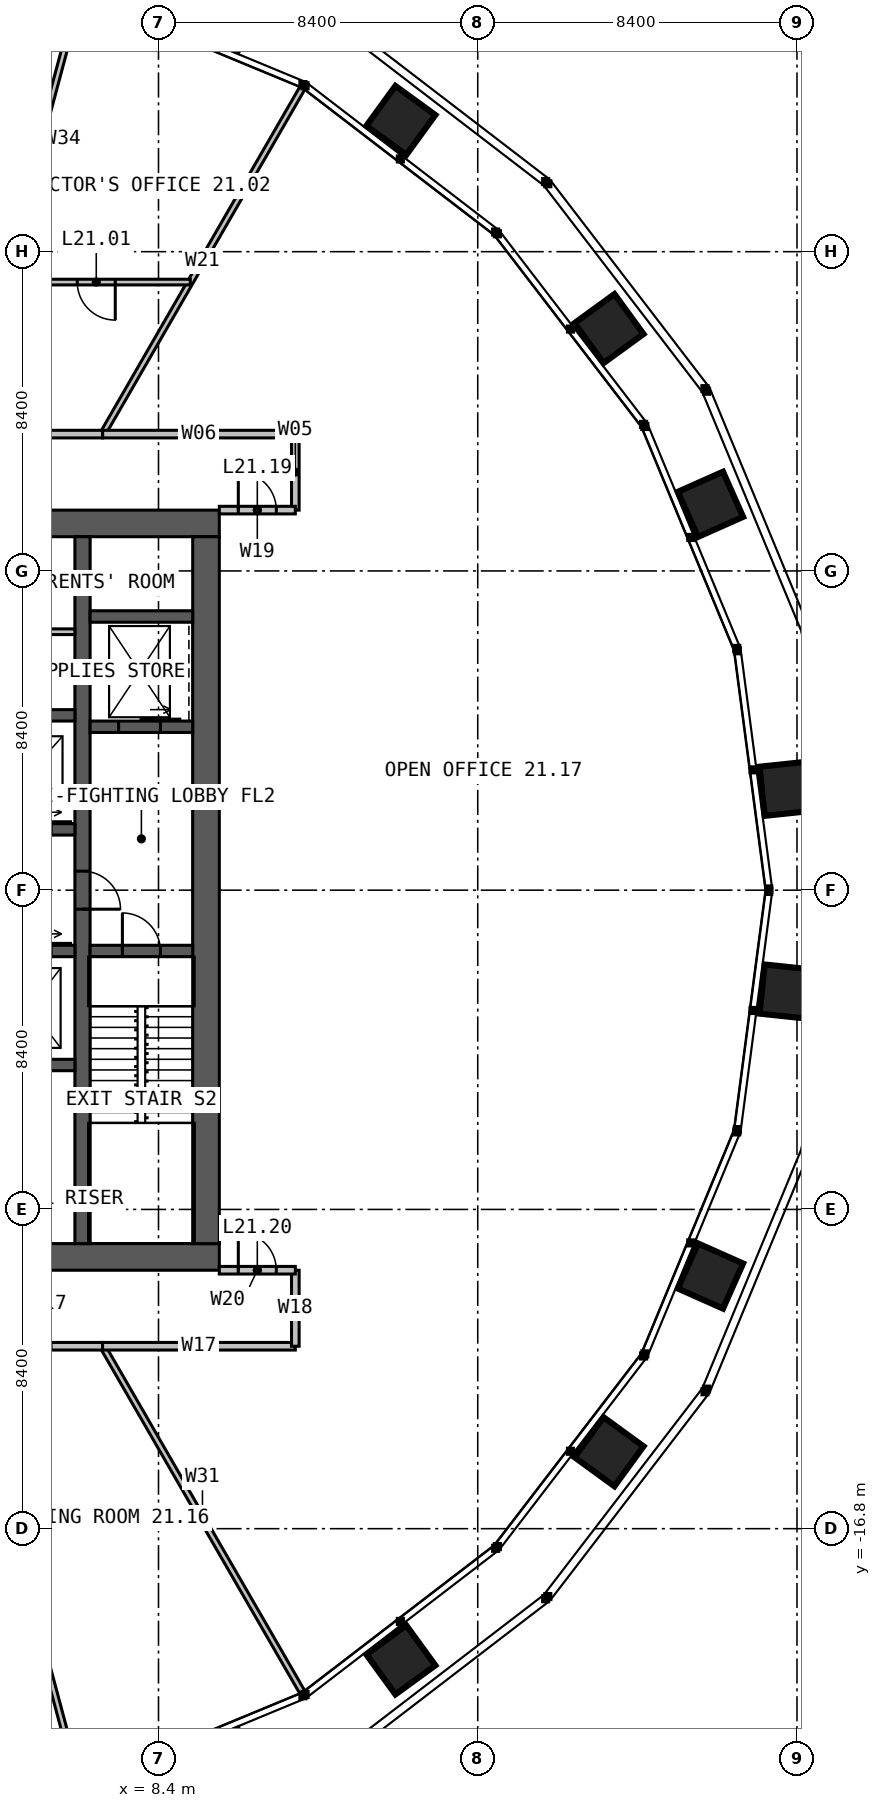
"""IFC4 building model, lengths in metres.
Left out: names, types, materials, properties, quantities, classifications, styles, units other than length and angle.
Written with IfcOpenShell. Run it as: python <this file> out.ifc"""

import sys

from ifc_helpers import new_model, si_unit, direction, frame, frame_2d, origin, place, context, subcontext, project, spatial, rectangle, extrude, element, fill, save


model = new_model("IFC4")
c1 = context("Model", 3, precision=1e-05, world=origin(), true_north=direction((0.0, 1.0)))
c2 = subcontext(c1, "Body", "Model", "MODEL_VIEW")
j1 = project(units=[si_unit("LENGTHUNIT", "METRE"), si_unit("PLANEANGLEUNIT", "RADIAN")], contexts=[c1])
p1 = place(None, origin())
s1 = spatial("IfcSite", under=j1, at=p1, CompositionType="ELEMENT")
p2 = place(p1, origin())
s2 = spatial("IfcBuilding", under=s1, at=p2, CompositionType="ELEMENT")
p3 = place(p2, frame((0.0, 0.0, 90.0)))
s3 = spatial("IfcBuildingStorey", under=s2, at=p3, CompositionType="ELEMENT", Elevation=90.0)
p4 = place(p3, frame((-10.0, 9.65, 0.0), z_axis=(0.0, 0.0, 1.0), x_axis=(1.0, 0.0, 0.0)))
e1 = element("IfcWall", 1, at=p4, inside=s3, PredefinedType="SOLIDWALL", context=c2, shape_type="SweptSolid", body=[
    extrude(rectangle(XDim=20.0, YDim=0.7, at=frame_2d((10.0, 0.0))), origin(), (0.0, 0.0, 1.0), 4.0),
])
p5 = place(p4, frame((9.4, 0.0, 0.0)))
e2 = element("IfcOpeningElement", 2, at=p5, cuts=e1, PredefinedType="OPENING", context=c2, shape_type="SweptSolid", body=[
    extrude(rectangle(XDim=1.2, YDim=2.2, at=frame_2d((0.6, 1.1))), frame((0.0, 0.36, 0.0), z_axis=(0.0, -1.0, 0.0), x_axis=(1.0, 0.0, 0.0)), (0.0, 0.0, 1.0), 0.72),
])
p6 = place(p3, frame((10.0, -9.65, 0.0), z_axis=(0.0, 0.0, 1.0), x_axis=(-1.0, 0.0, 0.0)))
e3 = element("IfcWall", 3, at=p6, inside=s3, PredefinedType="SOLIDWALL", context=c2, shape_type="SweptSolid", body=[
    extrude(rectangle(XDim=20.0, YDim=0.7, at=frame_2d((10.0, 0.0))), origin(), (0.0, 0.0, 1.0), 4.0),
])
p7 = place(p6, frame((6.875, 0.0, 0.0)))
e4 = element("IfcOpeningElement", 4, at=p7, cuts=e3, PredefinedType="OPENING", context=c2, shape_type="SweptSolid", body=[
    extrude(rectangle(XDim=1.2, YDim=2.2, at=frame_2d((0.6, 1.1))), frame((0.0, 0.36, 0.0), z_axis=(0.0, -1.0, 0.0), x_axis=(1.0, 0.0, 0.0)), (0.0, 0.0, 1.0), 0.72),
])
p8 = place(p3, frame((9.65, -9.3, 0.0), z_axis=(0.0, 0.0, 1.0), x_axis=(0.0, 1.0, 0.0)))
e5 = element("IfcWall", 5, at=p8, inside=s3, PredefinedType="SOLIDWALL", context=c2, shape_type="SweptSolid", body=[
    extrude(rectangle(XDim=18.6, YDim=0.7, at=frame_2d((9.3, 0.0))), origin(), (0.0, 0.0, 1.0), 4.0),
])
p9 = place(p3, frame((6.4, 9.3, 0.0), z_axis=(0.0, 0.0, 1.0), x_axis=(0.0, -1.0, 0.0)))
e6 = element("IfcWall", 6, at=p9, inside=s3, PredefinedType="SOLIDWALL", context=c2, shape_type="SweptSolid", body=[
    extrude(rectangle(XDim=18.6, YDim=0.4, at=frame_2d((9.3, 0.0))), origin(), (0.0, 0.0, 1.0), 4.0),
])
p10 = place(p9, frame((8.8, 0.0, 0.0)))
e7 = element("IfcOpeningElement", 7, at=p10, cuts=e6, PredefinedType="OPENING", context=c2, shape_type="SweptSolid", body=[
    extrude(rectangle(XDim=1.0, YDim=2.2, at=frame_2d((0.5, 1.1))), frame((0.0, 0.21, 0.0), z_axis=(0.0, -1.0, 0.0), x_axis=(1.0, 0.0, 0.0)), (0.0, 0.0, 1.0), 0.42),
])
p11 = place(p3, frame((1.35, 1.6, 0.0), z_axis=(0.0, 0.0, 1.0), x_axis=(1.0, 0.0, 0.0)))
e8 = element("IfcWall", 8, at=p11, inside=s3, PredefinedType="SOLIDWALL", context=c2, shape_type="SweptSolid", body=[
    extrude(rectangle(XDim=4.85, YDim=0.3, at=frame_2d((2.425, 0.0))), origin(), (0.0, 0.0, 1.0), 4.0),
])
p12 = place(p11, frame((0.6, 0.0, 0.0)))
e9 = element("IfcOpeningElement", 9, at=p12, cuts=e8, PredefinedType="OPENING", context=c2, shape_type="SweptSolid", body=[
    extrude(rectangle(XDim=1.1, YDim=2.2, at=frame_2d((0.55, 1.1))), frame((0.0, 0.16, 0.0), z_axis=(0.0, -1.0, 0.0), x_axis=(1.0, 0.0, 0.0)), (0.0, 0.0, 1.0), 0.32),
])
p13 = place(p11, frame((3.125, 0.0, 0.0)))
e10 = element("IfcOpeningElement", 10, at=p13, cuts=e8, PredefinedType="OPENING", context=c2, shape_type="SweptSolid", body=[
    extrude(rectangle(XDim=1.1, YDim=2.2, at=frame_2d((0.55, 1.1))), frame((0.0, 0.16, 0.0), z_axis=(0.0, -1.0, 0.0), x_axis=(1.0, 0.0, 0.0)), (0.0, 0.0, 1.0), 0.32),
])
p14 = place(p3, frame((1.35, 4.6, 0.0), z_axis=(0.0, 0.0, 1.0), x_axis=(1.0, 0.0, 0.0)))
e11 = element("IfcWall", 11, at=p14, inside=s3, PredefinedType="SOLIDWALL", context=c2, shape_type="SweptSolid", body=[
    extrude(rectangle(XDim=4.85, YDim=0.3, at=frame_2d((2.425, 0.0))), origin(), (0.0, 0.0, 1.0), 4.0),
])
p15 = place(p3, frame((3.85, -1.6, 0.0), z_axis=(0.0, 0.0, 1.0), x_axis=(1.0, 0.0, 0.0)))
e12 = element("IfcWall", 12, at=p15, inside=s3, PredefinedType="SOLIDWALL", context=c2, shape_type="SweptSolid", body=[
    extrude(rectangle(XDim=2.35, YDim=0.3, at=frame_2d((1.175, 0.0))), origin(), (0.0, 0.0, 1.0), 4.0),
])
p16 = place(p15, frame((0.625, 0.0, 0.0)))
e13 = element("IfcOpeningElement", 13, at=p16, cuts=e12, PredefinedType="OPENING", context=c2, shape_type="SweptSolid", body=[
    extrude(rectangle(XDim=1.1, YDim=2.2, at=frame_2d((0.55, 1.1))), frame((0.0, 0.16, 0.0), z_axis=(0.0, -1.0, 0.0), x_axis=(1.0, 0.0, 0.0)), (0.0, 0.0, 1.0), 0.32),
])
p17 = place(p3, frame((3.85, -4.6, 0.0), z_axis=(0.0, 0.0, 1.0), x_axis=(1.0, 0.0, 0.0)))
e14 = element("IfcWall", 14, at=p17, inside=s3, PredefinedType="SOLIDWALL", context=c2, shape_type="SweptSolid", body=[
    extrude(rectangle(XDim=2.35, YDim=0.3, at=frame_2d((1.175, 0.0))), origin(), (0.0, 0.0, 1.0), 4.0),
])
p18 = place(p3, frame((6.6, -1.6, 0.0), z_axis=(0.0, 0.0, 1.0), x_axis=(1.0, 0.0, 0.0)))
e15 = element("IfcWall", 15, at=p18, inside=s3, PredefinedType="SOLIDWALL", context=c2, shape_type="SweptSolid", body=[
    extrude(rectangle(XDim=2.7, YDim=0.3, at=frame_2d((1.35, 0.0))), origin(), (0.0, 0.0, 1.0), 4.0),
])
p19 = place(p18, frame((0.85, 0.0, 0.0)))
e16 = element("IfcOpeningElement", 16, at=p19, cuts=e15, PredefinedType="OPENING", context=c2, shape_type="SweptSolid", body=[
    extrude(rectangle(XDim=1.0, YDim=2.2, at=frame_2d((0.5, 1.1))), frame((0.0, 0.16, 0.0), z_axis=(0.0, -1.0, 0.0), x_axis=(1.0, 0.0, 0.0)), (0.0, 0.0, 1.0), 0.32),
])
p20 = place(p3, frame((6.6, 4.3, 0.0), z_axis=(0.0, 0.0, 1.0), x_axis=(1.0, 0.0, 0.0)))
e17 = element("IfcWall", 17, at=p20, inside=s3, PredefinedType="SOLIDWALL", context=c2, shape_type="SweptSolid", body=[
    extrude(rectangle(XDim=2.7, YDim=0.3, at=frame_2d((1.35, 0.0))), origin(), (0.0, 0.0, 1.0), 4.0),
])
p21 = place(p20, frame((0.75, 0.0, 0.0)))
e18 = element("IfcOpeningElement", 18, at=p21, cuts=e17, PredefinedType="OPENING", context=c2, shape_type="SweptSolid", body=[
    extrude(rectangle(XDim=1.1, YDim=2.2, at=frame_2d((0.55, 1.1))), frame((0.0, 0.16, 0.0), z_axis=(0.0, -1.0, 0.0), x_axis=(1.0, 0.0, 0.0)), (0.0, 0.0, 1.0), 0.32),
])
p22 = place(p3, frame((6.6, 7.2, 0.0), z_axis=(0.0, 0.0, 1.0), x_axis=(1.0, 0.0, 0.0)))
e19 = element("IfcWall", 19, at=p22, inside=s3, PredefinedType="SOLIDWALL", context=c2, shape_type="SweptSolid", body=[
    extrude(rectangle(XDim=2.7, YDim=0.3, at=frame_2d((1.35, 0.0))), origin(), (0.0, 0.0, 1.0), 4.0),
])
p23 = place(p3, frame((1.35, 6.8, 0.0), z_axis=(0.0, 0.0, 1.0), x_axis=(1.0, 0.0, 0.0)))
e20 = element("IfcWall", 20, at=p23, inside=s3, PredefinedType="PARTITIONING", context=c2, shape_type="SweptSolid", body=[
    extrude(rectangle(XDim=4.85, YDim=0.15, at=frame_2d((2.425, 0.0))), origin(), (0.0, 0.0, 1.0), 3.75),
])
p24 = place(p23, frame((3.15, 0.0, 0.0)))
e21 = element("IfcOpeningElement", 21, at=p24, cuts=e20, PredefinedType="OPENING", context=c2, shape_type="SweptSolid", body=[
    extrude(rectangle(XDim=0.9, YDim=2.2, at=frame_2d((0.45, 1.1))), frame((0.0, 0.085, 0.0), z_axis=(0.0, -1.0, 0.0), x_axis=(1.0, 0.0, 0.0)), (0.0, 0.0, 1.0), 0.17),
])
p25 = place(p3, frame((6.928, 12.0, 0.0), z_axis=(0.0, 0.0, 1.0), x_axis=(0.499995153367, 0.866028201971, 0.0)))
e22 = element("IfcWall", 22, at=p25, inside=s3, PredefinedType="PARTITIONING", context=c2, shape_type="SweptSolid", body=[
    extrude(rectangle(XDim=10.514, YDim=0.15, at=frame_2d((5.257, 0.0))), origin(), (0.0, 0.0, 1.0), 2.89),
])
p26 = place(p3, frame((3.215, -12.0, 0.0), z_axis=(0.0, 0.0, 1.0), x_axis=(0.258816099716, -0.965926615498, 0.0)))
e23 = element("IfcWall", 23, at=p26, inside=s3, PredefinedType="PARTITIONING", context=c2, shape_type="SweptSolid", body=[
    extrude(rectangle(XDim=11.947, YDim=0.15, at=frame_2d((5.973, 0.0))), origin(), (0.0, 0.0, 1.0), 2.89),
])
p27 = place(p3, frame((6.928, -12.0, 0.0), z_axis=(0.0, 0.0, 1.0), x_axis=(0.499995153367, -0.866028201971, 0.0)))
e24 = element("IfcWall", 24, at=p27, inside=s3, PredefinedType="PARTITIONING", context=c2, shape_type="SweptSolid", body=[
    extrude(rectangle(XDim=10.514, YDim=0.15, at=frame_2d((5.257, 0.0))), origin(), (0.0, 0.0, 1.0), 2.89),
])
p28 = place(p3, frame((12.0, 10.0, 0.0), z_axis=(0.0, 0.0, 1.0), x_axis=(0.0, 1.0, 0.0)))
e25 = element("IfcWall", 25, at=p28, inside=s3, PredefinedType="PARTITIONING", context=c2, shape_type="SweptSolid", body=[
    extrude(rectangle(XDim=2.0, YDim=0.2, at=frame_2d((1.0, 0.0))), origin(), (0.0, 0.0, 1.0), 3.8),
])
p29 = place(p3, frame((12.0, 12.0, 0.0), z_axis=(0.0, 0.0, 1.0), x_axis=(-1.0, 0.0, 0.0)))
e26 = element("IfcWall", 26, at=p29, inside=s3, PredefinedType="PARTITIONING", context=c2, shape_type="SweptSolid", body=[
    extrude(rectangle(XDim=5.072, YDim=0.2, at=frame_2d((2.536, 0.0))), origin(), (0.0, 0.0, 1.0), 3.8),
])
p30 = place(p3, frame((9.238, 16.0, 0.0), z_axis=(0.0, 0.0, 1.0), x_axis=(-1.0, 0.0, 0.0)))
e27 = element("IfcWall", 27, at=p30, inside=s3, PredefinedType="PARTITIONING", context=c2, shape_type="SweptSolid", body=[
    extrude(rectangle(XDim=13.525, YDim=0.15, at=frame_2d((6.762, 0.0))), origin(), (0.0, 0.0, 1.0), 2.89),
])
p31 = place(p30, frame((1.975, 0.0, 0.0)))
e28 = element("IfcOpeningElement", 28, at=p31, cuts=e27, PredefinedType="OPENING", context=c2, shape_type="SweptSolid", body=[
    extrude(rectangle(XDim=1.0, YDim=2.2, at=frame_2d((0.5, 1.1))), frame((0.0, 0.085, 0.0), z_axis=(0.0, -1.0, 0.0), x_axis=(1.0, 0.0, 0.0)), (0.0, 0.0, 1.0), 0.17),
])
p32 = place(p30, frame((7.647, 0.0, 0.0)))
e29 = element("IfcOpeningElement", 29, at=p32, cuts=e27, PredefinedType="OPENING", context=c2, shape_type="SweptSolid", body=[
    extrude(rectangle(XDim=1.0, YDim=2.2, at=frame_2d((0.5, 1.1))), frame((0.0, 0.085, 0.0), z_axis=(0.0, -1.0, 0.0), x_axis=(1.0, 0.0, 0.0)), (0.0, 0.0, 1.0), 0.17),
])
p33 = place(p30, frame((11.934, 0.0, 0.0)))
e30 = element("IfcOpeningElement", 30, at=p33, cuts=e27, PredefinedType="OPENING", context=c2, shape_type="SweptSolid", body=[
    extrude(rectangle(XDim=1.0, YDim=2.2, at=frame_2d((0.5, 1.1))), frame((0.0, 0.085, 0.0), z_axis=(0.0, -1.0, 0.0), x_axis=(1.0, 0.0, 0.0)), (0.0, 0.0, 1.0), 0.17),
])
p34 = place(p3, frame((4.287, 16.0, 0.0), z_axis=(0.0, 0.0, 1.0), x_axis=(0.258816859097, 0.965926412025, 0.0)))
e31 = element("IfcWall", 31, at=p34, inside=s3, PredefinedType="PARTITIONING", context=c2, shape_type="SweptSolid", body=[
    extrude(rectangle(XDim=7.806, YDim=0.15, at=frame_2d((3.903, 0.0))), origin(), (0.0, 0.0, 1.0), 2.89),
])
p35 = place(p3, frame((6.928, 12.0, 0.0), z_axis=(0.0, 0.0, 1.0), x_axis=(-1.0, 0.0, 0.0)))
e32 = element("IfcWall", 32, at=p35, inside=s3, PredefinedType="PARTITIONING", context=c2, shape_type="SweptSolid", body=[
    extrude(rectangle(XDim=10.144, YDim=0.2, at=frame_2d((5.072, 0.0))), origin(), (0.0, 0.0, 1.0), 3.8),
])
p36 = place(p35, frame((4.172, 0.0, 0.0)))
e33 = element("IfcOpeningElement", 33, at=p36, cuts=e32, PredefinedType="OPENING", context=c2, shape_type="SweptSolid", body=[
    extrude(rectangle(XDim=1.8, YDim=2.2, at=frame_2d((0.9, 1.1))), frame((0.0, 0.11, 0.0), z_axis=(0.0, -1.0, 0.0), x_axis=(1.0, 0.0, 0.0)), (0.0, 0.0, 1.0), 0.22),
])
p37 = place(p3, frame((3.215, -12.0, 0.0), z_axis=(0.0, 0.0, 1.0), x_axis=(1.0, 0.0, 0.0)))
e34 = element("IfcWall", 34, at=p37, inside=s3, PredefinedType="PARTITIONING", context=c2, shape_type="SweptSolid", body=[
    extrude(rectangle(XDim=3.713, YDim=0.2, at=frame_2d((1.856, 0.0))), origin(), (0.0, 0.0, 1.0), 3.8),
])
p38 = place(p37, frame((1.356, 0.0, 0.0)))
e35 = element("IfcOpeningElement", 35, at=p38, cuts=e34, PredefinedType="OPENING", context=c2, shape_type="SweptSolid", body=[
    extrude(rectangle(XDim=1.0, YDim=2.2, at=frame_2d((0.5, 1.1))), frame((0.0, 0.11, 0.0), z_axis=(0.0, -1.0, 0.0), x_axis=(1.0, 0.0, 0.0)), (0.0, 0.0, 1.0), 0.22),
])
p39 = place(p3, frame((6.928, -12.0, 0.0), z_axis=(0.0, 0.0, 1.0), x_axis=(1.0, 0.0, 0.0)))
e36 = element("IfcWall", 36, at=p39, inside=s3, PredefinedType="PARTITIONING", context=c2, shape_type="SweptSolid", body=[
    extrude(rectangle(XDim=5.072, YDim=0.2, at=frame_2d((2.536, 0.0))), origin(), (0.0, 0.0, 1.0), 3.8),
])
p40 = place(p3, frame((12.0, -12.0, 0.0), z_axis=(0.0, 0.0, 1.0), x_axis=(0.0, 1.0, 0.0)))
e37 = element("IfcWall", 37, at=p40, inside=s3, PredefinedType="PARTITIONING", context=c2, shape_type="SweptSolid", body=[
    extrude(rectangle(XDim=2.0, YDim=0.2, at=frame_2d((1.0, 0.0))), origin(), (0.0, 0.0, 1.0), 3.8),
])
p41 = place(p3, frame((10.0, 10.0, 0.0), z_axis=(0.0, 0.0, 1.0), x_axis=(1.0, 0.0, 0.0)))
e38 = element("IfcWall", 38, at=p41, inside=s3, PredefinedType="PARTITIONING", context=c2, shape_type="SweptSolid", body=[
    extrude(rectangle(XDim=2.0, YDim=0.2, at=frame_2d((1.0, 0.0))), origin(), (0.0, 0.0, 1.0), 3.8),
])
p42 = place(p41, frame((0.5, 0.0, 0.0)))
e39 = element("IfcOpeningElement", 39, at=p42, cuts=e38, PredefinedType="OPENING", context=c2, shape_type="SweptSolid", body=[
    extrude(rectangle(XDim=1.0, YDim=2.2, at=frame_2d((0.5, 1.1))), frame((0.0, 0.11, 0.0), z_axis=(0.0, -1.0, 0.0), x_axis=(1.0, 0.0, 0.0)), (0.0, 0.0, 1.0), 0.22),
])
p43 = place(p3, frame((10.0, -10.0, 0.0), z_axis=(0.0, 0.0, 1.0), x_axis=(1.0, 0.0, 0.0)))
e40 = element("IfcWall", 40, at=p43, inside=s3, PredefinedType="PARTITIONING", context=c2, shape_type="SweptSolid", body=[
    extrude(rectangle(XDim=2.0, YDim=0.2, at=frame_2d((1.0, 0.0))), origin(), (0.0, 0.0, 1.0), 3.8),
])
p44 = place(p43, frame((0.5, 0.0, 0.0)))
e41 = element("IfcOpeningElement", 41, at=p44, cuts=e40, PredefinedType="OPENING", context=c2, shape_type="SweptSolid", body=[
    extrude(rectangle(XDim=1.0, YDim=2.2, at=frame_2d((0.5, 1.1))), frame((0.0, 0.11, 0.0), z_axis=(0.0, -1.0, 0.0), x_axis=(1.0, 0.0, 0.0)), (0.0, 0.0, 1.0), 0.22),
])
p45 = place(p10, origin())
e42 = element("IfcDoor", 42, at=p45, inside=s3, OperationType="SINGLE_SWING_RIGHT", PredefinedType="DOOR", context=c2, shape_type="SweptSolid", body=[
    extrude(rectangle(XDim=1.0, YDim=2.2, at=frame_2d((0.5, 1.1))), frame((0.0, 0.025, 0.0), z_axis=(0.0, -1.0, 0.0), x_axis=(1.0, 0.0, 0.0)), (0.0, 0.0, 1.0), 0.05),
])
fill(e7, e42)
p46 = place(p19, origin())
e43 = element("IfcDoor", 43, at=p46, inside=s3, OperationType="SINGLE_SWING_LEFT", PredefinedType="DOOR", context=c2, shape_type="SweptSolid", body=[
    extrude(rectangle(XDim=1.0, YDim=2.2, at=frame_2d((0.5, 1.1))), frame((0.0, 0.025, 0.0), z_axis=(0.0, -1.0, 0.0), x_axis=(1.0, 0.0, 0.0)), (0.0, 0.0, 1.0), 0.05),
])
fill(e16, e43)
p47 = place(p21, origin())
e44 = element("IfcDoor", 44, at=p47, inside=s3, OperationType="SLIDING_TO_LEFT", PredefinedType="DOOR", context=c2, shape_type="SweptSolid", body=[
    extrude(rectangle(XDim=1.1, YDim=2.2, at=frame_2d((0.55, 1.1))), frame((0.0, 0.025, 0.0), z_axis=(0.0, -1.0, 0.0), x_axis=(1.0, 0.0, 0.0)), (0.0, 0.0, 1.0), 0.05),
])
fill(e18, e44)
p48 = place(p31, origin())
e45 = element("IfcDoor", 45, at=p48, inside=s3, OperationType="SINGLE_SWING_LEFT", PredefinedType="DOOR", context=c2, shape_type="SweptSolid", body=[
    extrude(rectangle(XDim=1.0, YDim=2.2, at=frame_2d((0.5, 1.1))), frame((0.0, 0.025, 0.0), z_axis=(0.0, -1.0, 0.0), x_axis=(1.0, 0.0, 0.0)), (0.0, 0.0, 1.0), 0.05),
])
fill(e28, e45)
p49 = place(p42, origin())
e46 = element("IfcDoor", 46, at=p49, inside=s3, OperationType="SINGLE_SWING_LEFT", PredefinedType="DOOR", context=c2, shape_type="SweptSolid", body=[
    extrude(rectangle(XDim=1.0, YDim=2.2, at=frame_2d((0.5, 1.1))), frame((0.0, 0.025, 0.0), z_axis=(0.0, -1.0, 0.0), x_axis=(1.0, 0.0, 0.0)), (0.0, 0.0, 1.0), 0.05),
])
fill(e39, e46)
p50 = place(p44, origin())
e47 = element("IfcDoor", 47, at=p50, inside=s3, OperationType="SINGLE_SWING_LEFT", PredefinedType="DOOR", context=c2, shape_type="SweptSolid", body=[
    extrude(rectangle(XDim=1.0, YDim=2.2, at=frame_2d((0.5, 1.1))), frame((0.0, 0.025, 0.0), z_axis=(0.0, -1.0, 0.0), x_axis=(1.0, 0.0, 0.0)), (0.0, 0.0, 1.0), 0.05),
])
fill(e41, e47)
save(model, sys.argv[1])
